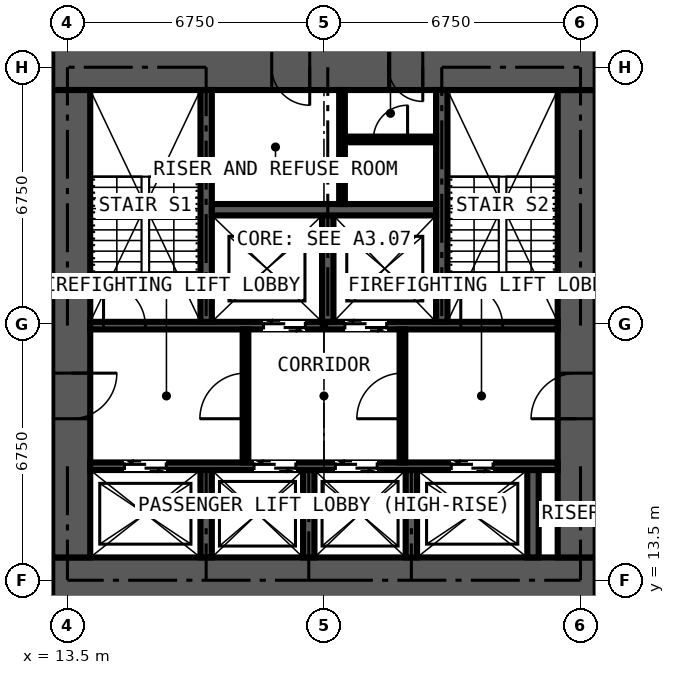
"""IFC4 building model, lengths in metres.
Left out: names, types, materials, properties, quantities, classifications, styles, units other than length and angle.
Written with IfcOpenShell. Run it as: python <this file> out.ifc"""

import sys

from ifc_helpers import new_model, si_unit, direction, frame, frame_2d, origin, place, context, subcontext, project, spatial, rectangle, extrude, element, fill, save


model = new_model("IFC4")
c1 = context("Model", 3, precision=1e-05, world=origin(), true_north=direction((0.0, 1.0)))
c2 = subcontext(c1, "Body", "Model", "MODEL_VIEW")
j1 = project(units=[si_unit("LENGTHUNIT", "METRE"), si_unit("PLANEANGLEUNIT", "RADIAN")], contexts=[c1])
p1 = place(None, origin())
s1 = spatial("IfcSite", under=j1, at=p1, CompositionType="ELEMENT")
p2 = place(p1, origin())
s2 = spatial("IfcBuilding", under=s1, at=p2, CompositionType="ELEMENT")
p3 = place(p2, frame((0.0, 0.0, 167.4)))
s3 = spatial("IfcBuildingStorey", under=s2, at=p3, CompositionType="ELEMENT", Elevation=167.4)
p4 = place(p3, frame((13.1, 13.5, 0.0), z_axis=(0.0, 0.0, 1.0), x_axis=(1.0, 0.0, 0.0)))
e1 = element("IfcWall", 1, at=p4, inside=s3, PredefinedType="SHEAR", context=c2, shape_type="SweptSolid", body=[
    extrude(rectangle(XDim=14.3, YDim=1.2, at=frame_2d((7.15, 0.0))), origin(), (0.0, 0.0, 1.0), 3.6),
])
p5 = place(p3, frame((26.9, 14.1, 0.0), z_axis=(0.0, 0.0, 1.0), x_axis=(0.0, 1.0, 0.0)))
e2 = element("IfcWall", 2, at=p5, inside=s3, PredefinedType="SHEAR", context=c2, shape_type="SweptSolid", body=[
    extrude(rectangle(XDim=12.3, YDim=1.0, at=frame_2d((6.15, 0.0))), origin(), (0.0, 0.0, 1.0), 3.6),
])
p6 = place(p5, frame((3.65, 0.0, 0.0)))
e3 = element("IfcOpeningElement", 3, at=p6, cuts=e2, PredefinedType="OPENING", context=c2, shape_type="SweptSolid", body=[
    extrude(rectangle(XDim=1.2, YDim=2.2, at=frame_2d((0.6, 1.1))), frame((0.0, 0.51, 0.0), z_axis=(0.0, -1.0, 0.0), x_axis=(1.0, 0.0, 0.0)), (0.0, 0.0, 1.0), 1.02),
])
p7 = place(p3, frame((27.4, 27.0, 0.0), z_axis=(0.0, 0.0, 1.0), x_axis=(-1.0, 0.0, 0.0)))
e4 = element("IfcWall", 4, at=p7, inside=s3, PredefinedType="SHEAR", context=c2, shape_type="SweptSolid", body=[
    extrude(rectangle(XDim=14.3, YDim=1.2, at=frame_2d((7.15, 0.0))), origin(), (0.0, 0.0, 1.0), 3.6),
])
p8 = place(p7, frame((4.55, 0.0, 0.0)))
e5 = element("IfcOpeningElement", 5, at=p8, cuts=e4, PredefinedType="OPENING", context=c2, shape_type="SweptSolid", body=[
    extrude(rectangle(XDim=0.9, YDim=2.2, at=frame_2d((0.45, 1.1))), frame((0.0, 0.61, 0.0), z_axis=(0.0, -1.0, 0.0), x_axis=(1.0, 0.0, 0.0)), (0.0, 0.0, 1.0), 1.22),
])
p9 = place(p7, frame((7.525, 0.0, 0.0)))
e6 = element("IfcOpeningElement", 6, at=p9, cuts=e4, PredefinedType="OPENING", context=c2, shape_type="SweptSolid", body=[
    extrude(rectangle(XDim=1.0, YDim=2.2, at=frame_2d((0.5, 1.1))), frame((0.0, 0.61, 0.0), z_axis=(0.0, -1.0, 0.0), x_axis=(1.0, 0.0, 0.0)), (0.0, 0.0, 1.0), 1.22),
])
p10 = place(p3, frame((13.6, 26.4, 0.0), z_axis=(0.0, 0.0, 1.0), x_axis=(0.0, -1.0, 0.0)))
e7 = element("IfcWall", 7, at=p10, inside=s3, PredefinedType="SHEAR", context=c2, shape_type="SweptSolid", body=[
    extrude(rectangle(XDim=12.3, YDim=1.0, at=frame_2d((6.15, 0.0))), origin(), (0.0, 0.0, 1.0), 3.6),
])
p11 = place(p10, frame((7.45, 0.0, 0.0)))
e8 = element("IfcOpeningElement", 8, at=p11, cuts=e7, PredefinedType="OPENING", context=c2, shape_type="SweptSolid", body=[
    extrude(rectangle(XDim=1.2, YDim=2.2, at=frame_2d((0.6, 1.1))), frame((0.0, 0.51, 0.0), z_axis=(0.0, -1.0, 0.0), x_axis=(1.0, 0.0, 0.0)), (0.0, 0.0, 1.0), 1.02),
])
p12 = place(p3, frame((14.1, 16.5, 0.0), z_axis=(0.0, 0.0, 1.0), x_axis=(1.0, 0.0, 0.0)))
e9 = element("IfcWall", 9, at=p12, inside=s3, PredefinedType="SHEAR", context=c2, shape_type="SweptSolid", body=[
    extrude(rectangle(XDim=12.3, YDim=0.2, at=frame_2d((6.15, 0.0))), origin(), (0.0, 0.0, 1.0), 3.6),
])
p13 = place(p12, frame((0.9, 0.0, 0.0)))
e10 = element("IfcOpeningElement", 10, at=p13, cuts=e9, PredefinedType="OPENING", context=c2, shape_type="SweptSolid", body=[
    extrude(rectangle(XDim=1.1, YDim=2.2, at=frame_2d((0.55, 1.1))), frame((0.0, 0.11, 0.0), z_axis=(0.0, -1.0, 0.0), x_axis=(1.0, 0.0, 0.0)), (0.0, 0.0, 1.0), 0.22),
])
p14 = place(p12, frame((4.31, 0.0, 0.0)))
e11 = element("IfcOpeningElement", 11, at=p14, cuts=e9, PredefinedType="OPENING", context=c2, shape_type="SweptSolid", body=[
    extrude(rectangle(XDim=1.1, YDim=2.2, at=frame_2d((0.55, 1.1))), frame((0.0, 0.11, 0.0), z_axis=(0.0, -1.0, 0.0), x_axis=(1.0, 0.0, 0.0)), (0.0, 0.0, 1.0), 0.22),
])
p15 = place(p12, frame((6.45, 0.0, 0.0)))
e12 = element("IfcOpeningElement", 12, at=p15, cuts=e9, PredefinedType="OPENING", context=c2, shape_type="SweptSolid", body=[
    extrude(rectangle(XDim=1.1, YDim=2.2, at=frame_2d((0.55, 1.1))), frame((0.0, 0.11, 0.0), z_axis=(0.0, -1.0, 0.0), x_axis=(1.0, 0.0, 0.0)), (0.0, 0.0, 1.0), 0.22),
])
p16 = place(p12, frame((9.5, 0.0, 0.0)))
e13 = element("IfcOpeningElement", 13, at=p16, cuts=e9, PredefinedType="OPENING", context=c2, shape_type="SweptSolid", body=[
    extrude(rectangle(XDim=1.1, YDim=2.2, at=frame_2d((0.55, 1.1))), frame((0.0, 0.11, 0.0), z_axis=(0.0, -1.0, 0.0), x_axis=(1.0, 0.0, 0.0)), (0.0, 0.0, 1.0), 0.22),
])
p17 = place(p3, frame((14.1, 20.2, 0.0), z_axis=(0.0, 0.0, 1.0), x_axis=(1.0, 0.0, 0.0)))
e14 = element("IfcWall", 14, at=p17, inside=s3, PredefinedType="SHEAR", context=c2, shape_type="SweptSolid", body=[
    extrude(rectangle(XDim=12.3, YDim=0.2, at=frame_2d((6.15, 0.0))), origin(), (0.0, 0.0, 1.0), 3.6),
])
p18 = place(p17, frame((4.56, 0.0, 0.0)))
e15 = element("IfcOpeningElement", 15, at=p18, cuts=e14, PredefinedType="OPENING", context=c2, shape_type="SweptSolid", body=[
    extrude(rectangle(XDim=1.1, YDim=2.2, at=frame_2d((0.55, 1.1))), frame((0.0, 0.11, 0.0), z_axis=(0.0, -1.0, 0.0), x_axis=(1.0, 0.0, 0.0)), (0.0, 0.0, 1.0), 0.22),
])
p19 = place(p17, frame((6.7, 0.0, 0.0)))
e16 = element("IfcOpeningElement", 16, at=p19, cuts=e14, PredefinedType="OPENING", context=c2, shape_type="SweptSolid", body=[
    extrude(rectangle(XDim=1.1, YDim=2.2, at=frame_2d((0.55, 1.1))), frame((0.0, 0.11, 0.0), z_axis=(0.0, -1.0, 0.0), x_axis=(1.0, 0.0, 0.0)), (0.0, 0.0, 1.0), 0.22),
])
p20 = place(p17, frame((0.35, 0.0, 0.0)))
e17 = element("IfcOpeningElement", 17, at=p20, cuts=e14, PredefinedType="OPENING", context=c2, shape_type="SweptSolid", body=[
    extrude(rectangle(XDim=1.1, YDim=2.2, at=frame_2d((0.55, 1.1))), frame((0.0, 0.11, 0.0), z_axis=(0.0, -1.0, 0.0), x_axis=(1.0, 0.0, 0.0)), (0.0, 0.0, 1.0), 0.22),
])
p21 = place(p17, frame((9.75, 0.0, 0.0)))
e18 = element("IfcOpeningElement", 18, at=p21, cuts=e14, PredefinedType="OPENING", context=c2, shape_type="SweptSolid", body=[
    extrude(rectangle(XDim=1.1, YDim=2.2, at=frame_2d((0.55, 1.1))), frame((0.0, 0.11, 0.0), z_axis=(0.0, -1.0, 0.0), x_axis=(1.0, 0.0, 0.0)), (0.0, 0.0, 1.0), 0.22),
])
for number, where, z_axis, x_axis in (
    (19, (17.15, 20.3, 0.0), (0.0, 0.0, 1.0), (0.0, 1.0, 0.0)),
    (20, (23.35, 20.3, 0.0), (0.0, 0.0, 1.0), (0.0, 1.0, 0.0)),
):
    element("IfcWall", number, at=place(p3, frame(where, z_axis=z_axis, x_axis=x_axis)), inside=s3, PredefinedType="SHEAR", context=c2, shape_type="SweptSolid", body=[
        extrude(rectangle(XDim=6.1, YDim=0.3, at=frame_2d((3.05, 0.0))), origin(), (0.0, 0.0, 1.0), 3.6),
    ])
p22 = place(p3, frame((20.35, 20.3, 0.0), z_axis=(0.0, 0.0, 1.0), x_axis=(0.0, 1.0, 0.0)))
e21 = element("IfcWall", 21, at=p22, inside=s3, PredefinedType="SHEAR", context=c2, shape_type="SweptSolid", body=[
    extrude(rectangle(XDim=2.8, YDim=0.3, at=frame_2d((1.4, 0.0))), origin(), (0.0, 0.0, 1.0), 3.6),
])
p23 = place(p3, frame((17.3, 23.25, 0.0), z_axis=(0.0, 0.0, 1.0), x_axis=(1.0, 0.0, 0.0)))
e22 = element("IfcWall", 22, at=p23, inside=s3, PredefinedType="SHEAR", context=c2, shape_type="SweptSolid", body=[
    extrude(rectangle(XDim=5.9, YDim=0.3, at=frame_2d((2.95, 0.0))), origin(), (0.0, 0.0, 1.0), 3.6),
])
for number, where, z_axis, x_axis in (
    (23, (17.15, 14.1, 0.0), (0.0, 0.0, 1.0), (0.0, 1.0, 0.0)),
    (24, (19.85, 14.1, 0.0), (0.0, 0.0, 1.0), (0.0, 1.0, 0.0)),
    (25, (22.55, 14.1, 0.0), (0.0, 0.0, 1.0), (0.0, 1.0, 0.0)),
    (26, (25.75, 14.1, 0.0), (0.0, 0.0, 1.0), (0.0, 1.0, 0.0)),
):
    element("IfcWall", number, at=place(p3, frame(where, z_axis=z_axis, x_axis=x_axis)), inside=s3, PredefinedType="SHEAR", context=c2, shape_type="SweptSolid", body=[
        extrude(rectangle(XDim=2.3, YDim=0.3, at=frame_2d((1.15, 0.0))), origin(), (0.0, 0.0, 1.0), 3.6),
    ])
p24 = place(p3, frame((18.185, 16.6, 0.0), z_axis=(0.0, 0.0, 1.0), x_axis=(0.0, 1.0, 0.0)))
e27 = element("IfcWall", 27, at=p24, inside=s3, PredefinedType="PARTITIONING", context=c2, shape_type="SweptSolid", body=[
    extrude(rectangle(XDim=3.5, YDim=0.15, at=frame_2d((1.75, 0.0))), origin(), (0.0, 0.0, 1.0), 3.375),
])
p25 = place(p24, frame((1.15, 0.0, 0.0)))
e28 = element("IfcOpeningElement", 28, at=p25, cuts=e27, PredefinedType="OPENING", context=c2, shape_type="SweptSolid", body=[
    extrude(rectangle(XDim=1.2, YDim=2.2, at=frame_2d((0.6, 1.1))), frame((0.0, 0.085, 0.0), z_axis=(0.0, -1.0, 0.0), x_axis=(1.0, 0.0, 0.0)), (0.0, 0.0, 1.0), 0.17),
])
p26 = place(p3, frame((22.315, 16.6, 0.0), z_axis=(0.0, 0.0, 1.0), x_axis=(0.0, 1.0, 0.0)))
e29 = element("IfcWall", 29, at=p26, inside=s3, PredefinedType="PARTITIONING", context=c2, shape_type="SweptSolid", body=[
    extrude(rectangle(XDim=3.5, YDim=0.15, at=frame_2d((1.75, 0.0))), origin(), (0.0, 0.0, 1.0), 3.375),
])
p27 = place(p26, frame((1.15, 0.0, 0.0)))
e30 = element("IfcOpeningElement", 30, at=p27, cuts=e29, PredefinedType="OPENING", context=c2, shape_type="SweptSolid", body=[
    extrude(rectangle(XDim=1.2, YDim=2.2, at=frame_2d((0.6, 1.1))), frame((0.0, 0.085, 0.0), z_axis=(0.0, -1.0, 0.0), x_axis=(1.0, 0.0, 0.0)), (0.0, 0.0, 1.0), 0.17),
])
p28 = place(p3, frame((20.725, 23.4, 0.0), z_axis=(0.0, 0.0, 1.0), x_axis=(0.0, 1.0, 0.0)))
e31 = element("IfcWall", 31, at=p28, inside=s3, PredefinedType="PARTITIONING", context=c2, shape_type="SweptSolid", body=[
    extrude(rectangle(XDim=3.0, YDim=0.15, at=frame_2d((1.5, 0.0))), origin(), (0.0, 0.0, 1.0), 3.375),
])
p29 = place(p3, frame((20.8, 25.1, 0.0), z_axis=(0.0, 0.0, 1.0), x_axis=(1.0, 0.0, 0.0)))
e32 = element("IfcWall", 32, at=p29, inside=s3, PredefinedType="PARTITIONING", context=c2, shape_type="SweptSolid", body=[
    extrude(rectangle(XDim=2.4, YDim=0.15, at=frame_2d((1.2, 0.0))), origin(), (0.0, 0.0, 1.0), 3.375),
])
p30 = place(p29, frame((0.75, 0.0, 0.0)))
e33 = element("IfcOpeningElement", 33, at=p30, cuts=e32, PredefinedType="OPENING", context=c2, shape_type="SweptSolid", body=[
    extrude(rectangle(XDim=0.9, YDim=2.2, at=frame_2d((0.45, 1.1))), frame((0.0, 0.085, 0.0), z_axis=(0.0, -1.0, 0.0), x_axis=(1.0, 0.0, 0.0)), (0.0, 0.0, 1.0), 0.17),
])
p31 = place(p13, origin())
e34 = element("IfcDoor", 34, at=p31, inside=s3, OperationType="DOUBLE_DOOR_SLIDING", PredefinedType="DOOR", context=c2, shape_type="SweptSolid", body=[
    extrude(rectangle(XDim=1.1, YDim=2.2, at=frame_2d((0.55, 1.1))), frame((0.0, 0.025, 0.0), z_axis=(0.0, -1.0, 0.0), x_axis=(1.0, 0.0, 0.0)), (0.0, 0.0, 1.0), 0.05),
])
fill(e10, e34)
p32 = place(p14, origin())
e35 = element("IfcDoor", 35, at=p32, inside=s3, OperationType="DOUBLE_DOOR_SLIDING", PredefinedType="DOOR", context=c2, shape_type="SweptSolid", body=[
    extrude(rectangle(XDim=1.1, YDim=2.2, at=frame_2d((0.55, 1.1))), frame((0.0, 0.025, 0.0), z_axis=(0.0, -1.0, 0.0), x_axis=(1.0, 0.0, 0.0)), (0.0, 0.0, 1.0), 0.05),
])
fill(e11, e35)
p33 = place(p15, origin())
e36 = element("IfcDoor", 36, at=p33, inside=s3, OperationType="DOUBLE_DOOR_SLIDING", PredefinedType="DOOR", context=c2, shape_type="SweptSolid", body=[
    extrude(rectangle(XDim=1.1, YDim=2.2, at=frame_2d((0.55, 1.1))), frame((0.0, 0.025, 0.0), z_axis=(0.0, -1.0, 0.0), x_axis=(1.0, 0.0, 0.0)), (0.0, 0.0, 1.0), 0.05),
])
fill(e12, e36)
p34 = place(p16, origin())
e37 = element("IfcDoor", 37, at=p34, inside=s3, OperationType="DOUBLE_DOOR_SLIDING", PredefinedType="DOOR", context=c2, shape_type="SweptSolid", body=[
    extrude(rectangle(XDim=1.1, YDim=2.2, at=frame_2d((0.55, 1.1))), frame((0.0, 0.025, 0.0), z_axis=(0.0, -1.0, 0.0), x_axis=(1.0, 0.0, 0.0)), (0.0, 0.0, 1.0), 0.05),
])
fill(e13, e37)
p35 = place(p18, origin())
e38 = element("IfcDoor", 38, at=p35, inside=s3, OperationType="DOUBLE_DOOR_SLIDING", PredefinedType="DOOR", context=c2, shape_type="SweptSolid", body=[
    extrude(rectangle(XDim=1.1, YDim=2.2, at=frame_2d((0.55, 1.1))), frame((0.0, 0.025, 0.0), z_axis=(0.0, -1.0, 0.0), x_axis=(1.0, 0.0, 0.0)), (0.0, 0.0, 1.0), 0.05),
])
fill(e15, e38)
p36 = place(p19, origin())
e39 = element("IfcDoor", 39, at=p36, inside=s3, OperationType="DOUBLE_DOOR_SLIDING", PredefinedType="DOOR", context=c2, shape_type="SweptSolid", body=[
    extrude(rectangle(XDim=1.1, YDim=2.2, at=frame_2d((0.55, 1.1))), frame((0.0, 0.025, 0.0), z_axis=(0.0, -1.0, 0.0), x_axis=(1.0, 0.0, 0.0)), (0.0, 0.0, 1.0), 0.05),
])
fill(e16, e39)
p37 = place(p11, origin())
e40 = element("IfcDoor", 40, at=p37, inside=s3, OperationType="DOUBLE_DOOR_SINGLE_SWING", PredefinedType="DOOR", context=c2, shape_type="SweptSolid", body=[
    extrude(rectangle(XDim=1.2, YDim=2.2, at=frame_2d((0.6, 1.1))), frame((0.0, 0.025, 0.0), z_axis=(0.0, -1.0, 0.0), x_axis=(1.0, 0.0, 0.0)), (0.0, 0.0, 1.0), 0.05),
])
fill(e8, e40)
p38 = place(p6, origin())
e41 = element("IfcDoor", 41, at=p38, inside=s3, OperationType="DOUBLE_DOOR_SINGLE_SWING", PredefinedType="DOOR", context=c2, shape_type="SweptSolid", body=[
    extrude(rectangle(XDim=1.2, YDim=2.2, at=frame_2d((0.6, 1.1))), frame((0.0, 0.025, 0.0), z_axis=(0.0, -1.0, 0.0), x_axis=(1.0, 0.0, 0.0)), (0.0, 0.0, 1.0), 0.05),
])
fill(e3, e41)
p39 = place(p25, origin())
e42 = element("IfcDoor", 42, at=p39, inside=s3, OperationType="DOUBLE_DOOR_SINGLE_SWING", PredefinedType="DOOR", context=c2, shape_type="SweptSolid", body=[
    extrude(rectangle(XDim=1.2, YDim=2.2, at=frame_2d((0.6, 1.1))), frame((0.0, 0.025, 0.0), z_axis=(0.0, -1.0, 0.0), x_axis=(1.0, 0.0, 0.0)), (0.0, 0.0, 1.0), 0.05),
])
fill(e28, e42)
p40 = place(p27, origin())
e43 = element("IfcDoor", 43, at=p40, inside=s3, OperationType="DOUBLE_DOOR_SINGLE_SWING", PredefinedType="DOOR", context=c2, shape_type="SweptSolid", body=[
    extrude(rectangle(XDim=1.2, YDim=2.2, at=frame_2d((0.6, 1.1))), frame((0.0, 0.025, 0.0), z_axis=(0.0, -1.0, 0.0), x_axis=(1.0, 0.0, 0.0)), (0.0, 0.0, 1.0), 0.05),
])
fill(e30, e43)
p41 = place(p30, origin())
e44 = element("IfcDoor", 44, at=p41, inside=s3, OperationType="SINGLE_SWING_RIGHT", PredefinedType="DOOR", context=c2, shape_type="SweptSolid", body=[
    extrude(rectangle(XDim=0.9, YDim=2.2, at=frame_2d((0.45, 1.1))), frame((0.0, 0.025, 0.0), z_axis=(0.0, -1.0, 0.0), x_axis=(1.0, 0.0, 0.0)), (0.0, 0.0, 1.0), 0.05),
])
fill(e33, e44)
p42 = place(p8, origin())
e45 = element("IfcDoor", 45, at=p42, inside=s3, OperationType="SINGLE_SWING_LEFT", PredefinedType="DOOR", context=c2, shape_type="SweptSolid", body=[
    extrude(rectangle(XDim=0.9, YDim=2.2, at=frame_2d((0.45, 1.1))), frame((0.0, 0.4, 0.0), z_axis=(0.0, -1.0, 0.0), x_axis=(1.0, 0.0, 0.0)), (0.0, 0.0, 1.0), 0.8),
])
fill(e5, e45)
p43 = place(p9, origin())
e46 = element("IfcDoor", 46, at=p43, inside=s3, OperationType="SINGLE_SWING_LEFT", PredefinedType="DOOR", context=c2, shape_type="SweptSolid", body=[
    extrude(rectangle(XDim=1.0, YDim=2.2, at=frame_2d((0.5, 1.1))), frame((0.0, 0.025, 0.0), z_axis=(0.0, -1.0, 0.0), x_axis=(1.0, 0.0, 0.0)), (0.0, 0.0, 1.0), 0.05),
])
fill(e6, e46)
p44 = place(p20, origin())
e47 = element("IfcDoor", 47, at=p44, inside=s3, OperationType="SINGLE_SWING_LEFT", PredefinedType="DOOR", context=c2, shape_type="SweptSolid", body=[
    extrude(rectangle(XDim=1.1, YDim=2.2, at=frame_2d((0.55, 1.1))), frame((0.0, 0.025, 0.0), z_axis=(0.0, -1.0, 0.0), x_axis=(1.0, 0.0, 0.0)), (0.0, 0.0, 1.0), 0.05),
])
fill(e17, e47)
p45 = place(p21, origin())
e48 = element("IfcDoor", 48, at=p45, inside=s3, OperationType="SINGLE_SWING_LEFT", PredefinedType="DOOR", context=c2, shape_type="SweptSolid", body=[
    extrude(rectangle(XDim=1.1, YDim=2.2, at=frame_2d((0.55, 1.1))), frame((0.0, 0.025, 0.0), z_axis=(0.0, -1.0, 0.0), x_axis=(1.0, 0.0, 0.0)), (0.0, 0.0, 1.0), 0.05),
])
fill(e18, e48)
save(model, sys.argv[1])
